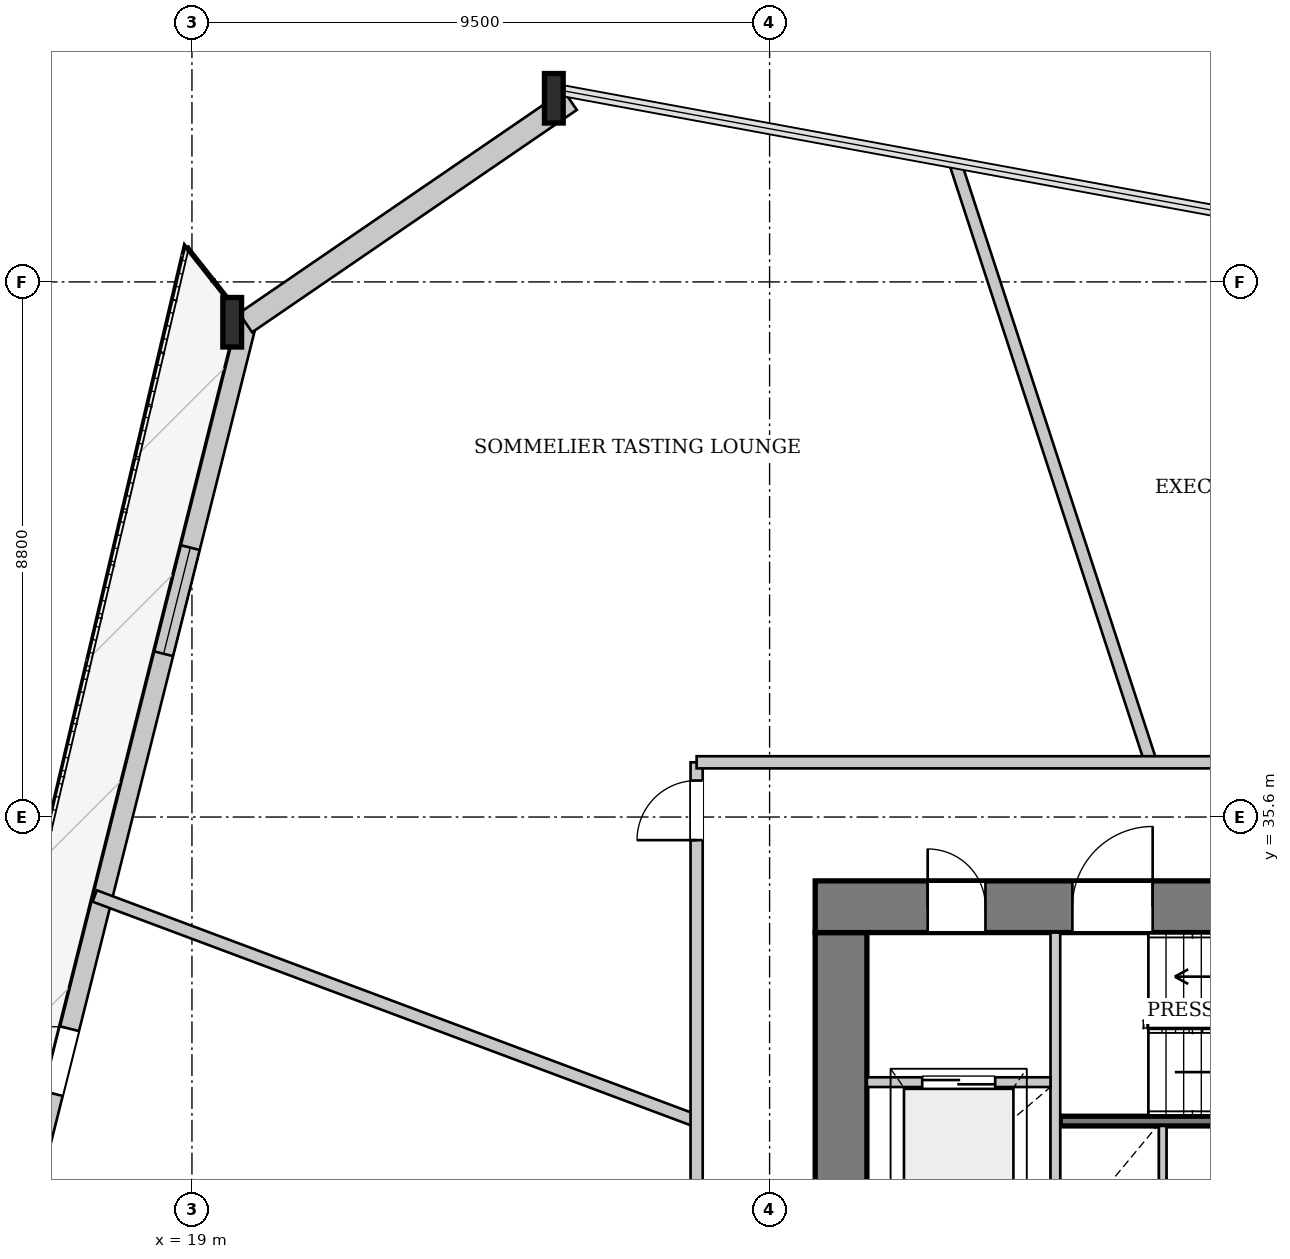
"""IFC4 building model, lengths in metres.
Left out: names, types, materials, properties, quantities, classifications, styles, units other than length and angle.
Written with IfcOpenShell. Run it as: python <this file> out.ifc"""

import sys

from ifc_helpers import new_model, si_unit, direction, frame, frame_2d, origin, origin_2d, place, context, subcontext, project, spatial, rectangle, i_section, extrude, source, transform, mapped, element, fill, save


model = new_model("IFC4")
c1 = context("Model", 3, precision=1e-05, world=origin(), true_north=direction((0.0, 1.0)))
c2 = subcontext(c1, "Body", "Model", "MODEL_VIEW")
j1 = project(units=[si_unit("LENGTHUNIT", "METRE"), si_unit("PLANEANGLEUNIT", "RADIAN")], contexts=[c1])
p1 = place(None, origin())
s1 = spatial("IfcSite", under=j1, at=p1, CompositionType="ELEMENT")
p2 = place(p1, origin())
s2 = spatial("IfcBuilding", under=s1, at=p2, CompositionType="ELEMENT")
p3 = place(p2, frame((0.0, 0.0, 43.5)))
s3 = spatial("IfcBuildingStorey", under=s2, at=p3, CompositionType="ELEMENT", Elevation=43.5)
m1 = source(origin(), c2, "Body", "SweptSolid", [
    extrude(i_section(OverallWidth=0.308, OverallDepth=0.814, WebThickness=0.021, FlangeThickness=0.04, at=origin_2d()), origin(), (0.0, 0.0, 1.0), 3.409),
])
p4 = place(p3, frame((25.115, 47.542, 0.0), z_axis=(-0.095810648173, -0.071392538287, 0.992836051508), x_axis=(0.597503990576, -0.801865937202, 0.0)))
e1 = element("IfcColumn", 1, at=p4, inside=s3, PredefinedType="COLUMN", context=c2, shape_type="MappedRepresentation", body=[
    mapped(m1, transform((0.0, 0.0, 0.0), x_axis=(1.0, 0.0, 0.0), y_axis=(0.0, 1.0, 0.0), z_axis=(0.0, 0.0, 1.0), scale=1.0)),
])
m2 = source(origin(), c2, "Body", "SweptSolid", [
    extrude(i_section(OverallWidth=0.308, OverallDepth=0.814, WebThickness=0.021, FlangeThickness=0.04, at=origin_2d()), origin(), (0.0, 0.0, 1.0), 3.405),
])
p5 = place(p3, frame((19.775, 43.885, 0.0), z_axis=(-0.06610046302, -0.086962973583, 0.994016181968), x_axis=(0.796124250752, -0.605133189772, 0.0)))
e2 = element("IfcColumn", 2, at=p5, inside=s3, PredefinedType="COLUMN", context=c2, shape_type="MappedRepresentation", body=[
    mapped(m2, transform((0.0, 0.0, 0.0), x_axis=(1.0, 0.0, 0.0), y_axis=(0.0, 1.0, 0.0), z_axis=(0.0, 0.0, 1.0), scale=1.0)),
])
p6 = place(p3, frame((15.405, 25.816, 0.0), z_axis=(0.0, 0.0, 1.0), x_axis=(0.243422395621, 0.969920376789, 0.0)))
e3 = element("IfcWall", 3, at=p6, inside=s3, PredefinedType="SOLIDWALL", context=c2, shape_type="SweptSolid", body=[
    extrude(rectangle(XDim=18.59, YDim=0.32, at=frame_2d((9.295, 0.0))), origin(), (0.0, 0.0, 1.0), 2.592),
])
p7 = place(p6, frame((5.399, 0.0, 0.0)))
e4 = element("IfcOpeningElement", 4, at=p7, cuts=e3, PredefinedType="OPENING", context=c2, shape_type="SweptSolid", body=[
    extrude(rectangle(XDim=1.1, YDim=2.3, at=frame_2d((0.55, 1.15))), frame((0.0, 0.17, 0.0), z_axis=(0.0, -1.0, 0.0), x_axis=(1.0, 0.0, 0.0)), (0.0, 0.0, 1.0), 0.34),
])
p8 = place(p6, frame((12.856, 0.0, 0.272)))
e5 = element("IfcOpeningElement", 5, at=p8, cuts=e3, PredefinedType="OPENING", context=c2, shape_type="SweptSolid", body=[
    extrude(rectangle(XDim=1.8, YDim=2.2, at=frame_2d((0.9, 1.1))), frame((0.0, 0.17, 0.0), z_axis=(0.0, -1.0, 0.0), x_axis=(1.0, 0.0, 0.0)), (0.0, 0.0, 1.0), 0.34),
])
p9 = place(p3, frame((19.882, 43.728, 0.0), z_axis=(0.0, 0.0, 1.0), x_axis=(0.825091616756, 0.564998959255, 0.0)))
e6 = element("IfcWall", 6, at=p9, inside=s3, PredefinedType="SOLIDWALL", context=c2, shape_type="SweptSolid", body=[
    extrude(rectangle(XDim=6.472, YDim=0.38, at=frame_2d((3.236, 0.0))), origin(), (0.0, 0.0, 1.0), 2.592),
])
p10 = place(p3, frame((29.675, 19.5, 0.0), z_axis=(0.0, 0.0, 1.0), x_axis=(0.0, 1.0, 0.0)))
e7 = element("IfcWall", 7, at=p10, inside=s3, PredefinedType="SHEAR", context=c2, shape_type="SweptSolid", body=[
    extrude(rectangle(XDim=14.2, YDim=0.85, at=frame_2d((7.1, 0.0))), origin(), (0.0, 0.0, 1.0), 3.3),
])
p11 = place(p10, frame((7.42, 0.0, 0.0)))
e8 = element("IfcOpeningElement", 8, at=p11, cuts=e7, PredefinedType="OPENING", context=c2, shape_type="SweptSolid", body=[
    extrude(rectangle(XDim=1.6, YDim=2.2, at=frame_2d((0.8, 1.1))), frame((0.0, 0.435, 0.0), z_axis=(0.0, -1.0, 0.0), x_axis=(1.0, 0.0, 0.0)), (0.0, 0.0, 1.0), 0.87),
])
p12 = place(p3, frame((29.25, 34.125, 0.0), z_axis=(0.0, 0.0, 1.0), x_axis=(1.0, 0.0, 0.0)))
e9 = element("IfcWall", 9, at=p12, inside=s3, PredefinedType="SHEAR", context=c2, shape_type="SweptSolid", body=[
    extrude(rectangle(XDim=17.5, YDim=0.85, at=frame_2d((8.75, 0.0))), origin(), (0.0, 0.0, 1.0), 3.3),
])
p13 = place(p12, frame((1.85, 0.0, 0.0)))
e10 = element("IfcOpeningElement", 10, at=p13, cuts=e9, PredefinedType="OPENING", context=c2, shape_type="SweptSolid", body=[
    extrude(rectangle(XDim=0.95, YDim=2.1, at=frame_2d((0.475, 1.05))), frame((0.0, 0.435, 0.0), z_axis=(0.0, -1.0, 0.0), x_axis=(1.0, 0.0, 0.0)), (0.0, 0.0, 1.0), 0.87),
])
p14 = place(p12, frame((4.23, 0.0, 0.0)))
e11 = element("IfcOpeningElement", 11, at=p14, cuts=e9, PredefinedType="OPENING", context=c2, shape_type="SweptSolid", body=[
    extrude(rectangle(XDim=1.32, YDim=2.2, at=frame_2d((0.66, 1.1))), frame((0.0, 0.435, 0.0), z_axis=(0.0, -1.0, 0.0), x_axis=(1.0, 0.0, 0.0)), (0.0, 0.0, 1.0), 0.87),
])
p15 = place(p12, frame((15.3, 0.0, 0.0)))
e12 = element("IfcOpeningElement", 12, at=p15, cuts=e9, PredefinedType="OPENING", context=c2, shape_type="SweptSolid", body=[
    extrude(rectangle(XDim=0.95, YDim=2.1, at=frame_2d((0.475, 1.05))), frame((0.0, 0.435, 0.0), z_axis=(0.0, -1.0, 0.0), x_axis=(1.0, 0.0, 0.0)), (0.0, 0.0, 1.0), 0.87),
])
p16 = place(p3, frame((33.28, 30.6, 0.0), z_axis=(0.0, 0.0, 1.0), x_axis=(1.0, 0.0, 0.0)))
e13 = element("IfcWall", 13, at=p16, inside=s3, PredefinedType="PARTITIONING", context=c2, shape_type="SweptSolid", body=[
    extrude(rectangle(XDim=7.3, YDim=0.16, at=frame_2d((3.65, 0.0))), origin(), (0.0, 0.0, 1.0), 3.3),
])
p17 = place(p3, frame((33.2, 28.44, 0.0), z_axis=(0.0, 0.0, 1.0), x_axis=(0.0, 1.0, 0.0)))
e14 = element("IfcWall", 14, at=p17, inside=s3, PredefinedType="PARTITIONING", context=c2, shape_type="SweptSolid", body=[
    extrude(rectangle(XDim=5.26, YDim=0.16, at=frame_2d((2.63, 0.0))), origin(), (0.0, 0.0, 1.0), 3.3),
])
p18 = place(p3, frame((30.1, 31.24, 0.0), z_axis=(0.0, 0.0, 1.0), x_axis=(1.0, 0.0, 0.0)))
e15 = element("IfcWall", 15, at=p18, inside=s3, PredefinedType="PARTITIONING", context=c2, shape_type="SweptSolid", body=[
    extrude(rectangle(XDim=3.02, YDim=0.16, at=frame_2d((1.51, 0.0))), origin(), (0.0, 0.0, 1.0), 3.3),
])
p19 = place(p18, frame((0.91, 0.0, 0.0)))
e16 = element("IfcOpeningElement", 16, at=p19, cuts=e15, PredefinedType="OPENING", context=c2, shape_type="SweptSolid", body=[
    extrude(rectangle(XDim=1.2, YDim=2.2, at=frame_2d((0.6, 1.1))), frame((0.0, 0.09, 0.0), z_axis=(0.0, -1.0, 0.0), x_axis=(1.0, 0.0, 0.0)), (0.0, 0.0, 1.0), 0.18),
])
p20 = place(p3, frame((34.965, 28.6, 0.0), z_axis=(0.0, 0.0, 1.0), x_axis=(0.0, 1.0, 0.0)))
e17 = element("IfcWall", 17, at=p20, inside=s3, PredefinedType="PARTITIONING", context=c2, shape_type="SweptSolid", body=[
    extrude(rectangle(XDim=1.92, YDim=0.125, at=frame_2d((0.96, 0.0))), origin(), (0.0, 0.0, 1.0), 3.3),
])
p21 = place(p3, frame((34.77, 36.5, 0.0), z_axis=(0.0, 0.0, 1.0), x_axis=(-0.310204417854, 0.950669879161, 0.0)))
e18 = element("IfcWall", 18, at=p21, inside=s3, PredefinedType="PARTITIONING", context=c2, shape_type="SweptSolid", body=[
    extrude(rectangle(XDim=10.334, YDim=0.2, at=frame_2d((5.167, 0.0))), origin(), (0.0, 0.0, 1.0), 3.3),
])
p22 = place(p3, frame((27.3, 30.601, 0.0), z_axis=(0.0, 0.0, 1.0), x_axis=(-0.936674280528, 0.350201787827, 0.0)))
e19 = element("IfcWall", 19, at=p22, inside=s3, PredefinedType="PARTITIONING", context=c2, shape_type="SweptSolid", body=[
    extrude(rectangle(XDim=10.569, YDim=0.2, at=frame_2d((5.284, 0.0))), origin(), (0.0, 0.0, 1.0), 3.3),
])
p23 = place(p3, frame((27.3, 16.7, 0.0), z_axis=(0.0, 0.0, 1.0), x_axis=(0.0, 1.0, 0.0)))
e20 = element("IfcWall", 20, at=p23, inside=s3, PredefinedType="PARTITIONING", context=c2, shape_type="SweptSolid", body=[
    extrude(rectangle(XDim=19.8, YDim=0.2, at=frame_2d((9.9, 0.0))), origin(), (0.0, 0.0, 1.0), 3.3),
])
p24 = place(p23, frame((18.52, 0.0, 0.0)))
e21 = element("IfcOpeningElement", 21, at=p24, cuts=e20, PredefinedType="OPENING", context=c2, shape_type="SweptSolid", body=[
    extrude(rectangle(XDim=0.98, YDim=2.15, at=frame_2d((0.49, 1.075))), frame((0.0, 0.11, 0.0), z_axis=(0.0, -1.0, 0.0), x_axis=(1.0, 0.0, 0.0)), (0.0, 0.0, 1.0), 0.22),
])
p25 = place(p23, frame((5.803, 0.0, 0.0)))
e22 = element("IfcOpeningElement", 22, at=p25, cuts=e20, PredefinedType="OPENING", context=c2, shape_type="SweptSolid", body=[
    extrude(rectangle(XDim=0.98, YDim=2.15, at=frame_2d((0.49, 1.075))), frame((0.0, 0.11, 0.0), z_axis=(0.0, -1.0, 0.0), x_axis=(1.0, 0.0, 0.0)), (0.0, 0.0, 1.0), 0.22),
])
p26 = place(p3, frame((27.3, 36.5, 0.0), z_axis=(0.0, 0.0, 1.0), x_axis=(1.0, 0.0, 0.0)))
e23 = element("IfcWall", 23, at=p26, inside=s3, PredefinedType="PARTITIONING", context=c2, shape_type="SweptSolid", body=[
    extrude(rectangle(XDim=21.4, YDim=0.2, at=frame_2d((10.7, 0.0))), origin(), (0.0, 0.0, 1.0), 3.3),
])
p27 = place(p26, frame((20.12, 0.0, 0.0)))
e24 = element("IfcOpeningElement", 24, at=p27, cuts=e23, PredefinedType="OPENING", context=c2, shape_type="SweptSolid", body=[
    extrude(rectangle(XDim=0.98, YDim=2.15, at=frame_2d((0.49, 1.075))), frame((0.0, 0.11, 0.0), z_axis=(0.0, -1.0, 0.0), x_axis=(1.0, 0.0, 0.0)), (0.0, 0.0, 1.0), 0.22),
])
p28 = place(p26, frame((12.385, 0.0, 0.0)))
e25 = element("IfcOpeningElement", 25, at=p28, cuts=e23, PredefinedType="OPENING", context=c2, shape_type="SweptSolid", body=[
    extrude(rectangle(XDim=0.98, YDim=2.15, at=frame_2d((0.49, 1.075))), frame((0.0, 0.11, 0.0), z_axis=(0.0, -1.0, 0.0), x_axis=(1.0, 0.0, 0.0)), (0.0, 0.0, 1.0), 0.22),
])
m3 = source(origin(), c2, "Body", "SweptSolid", [
    extrude(rectangle(XDim=1.1, YDim=2.3, at=frame_2d((0.55, 1.15))), frame((0.0, 0.025, 0.0), z_axis=(0.0, -1.0, 0.0), x_axis=(1.0, 0.0, 0.0)), (0.0, 0.0, 1.0), 0.05),
])
p29 = place(p7, origin())
e26 = element("IfcDoor", 26, at=p29, inside=s3, OperationType="SINGLE_SWING_LEFT", PredefinedType="DOOR", context=c2, shape_type="MappedRepresentation", body=[
    mapped(m3, transform((0.0, 0.0, 0.0), x_axis=(1.0, 0.0, 0.0), y_axis=(0.0, 1.0, 0.0), z_axis=(0.0, 0.0, 1.0), scale=1.0)),
])
fill(e4, e26)
m4 = source(origin(), c2, "Body", "SweptSolid", [
    extrude(rectangle(XDim=1.8, YDim=2.2, at=frame_2d((0.9, 1.1))), frame((0.0, 0.03, 0.0), z_axis=(0.0, -1.0, 0.0), x_axis=(1.0, 0.0, 0.0)), (0.0, 0.0, 1.0), 0.06),
])
p30 = place(p8, origin())
e27 = element("IfcWindow", 27, at=p30, inside=s3, PartitioningType="SINGLE_PANEL", PredefinedType="WINDOW", context=c2, shape_type="MappedRepresentation", body=[
    mapped(m4, transform((0.0, 0.0, 0.0), x_axis=(1.0, 0.0, 0.0), y_axis=(0.0, 1.0, 0.0), z_axis=(0.0, 0.0, 1.0), scale=1.0)),
])
fill(e5, e27)
m5 = source(origin(), c2, "Body", "SweptSolid", [
    extrude(rectangle(XDim=0.95, YDim=2.1, at=frame_2d((0.475, 1.05))), frame((0.0, 0.025, 0.0), z_axis=(0.0, -1.0, 0.0), x_axis=(1.0, 0.0, 0.0)), (0.0, 0.0, 1.0), 0.05),
])
p31 = place(p13, origin())
e28 = element("IfcDoor", 28, at=p31, inside=s3, OperationType="SINGLE_SWING_LEFT", PredefinedType="DOOR", context=c2, shape_type="MappedRepresentation", body=[
    mapped(m5, transform((0.0, 0.0, 0.0), x_axis=(1.0, 0.0, 0.0), y_axis=(0.0, 1.0, 0.0), z_axis=(0.0, 0.0, 1.0), scale=1.0)),
])
fill(e10, e28)
m6 = source(origin(), c2, "Body", "SweptSolid", [
    extrude(rectangle(XDim=1.32, YDim=2.2, at=frame_2d((0.66, 1.1))), frame((0.0, 0.025, 0.0), z_axis=(0.0, -1.0, 0.0), x_axis=(1.0, 0.0, 0.0)), (0.0, 0.0, 1.0), 0.05),
])
p32 = place(p14, origin())
e29 = element("IfcDoor", 29, at=p32, inside=s3, OperationType="SINGLE_SWING_RIGHT", PredefinedType="DOOR", context=c2, shape_type="MappedRepresentation", body=[
    mapped(m6, transform((0.0, 0.0, 0.0), x_axis=(1.0, 0.0, 0.0), y_axis=(0.0, 1.0, 0.0), z_axis=(0.0, 0.0, 1.0), scale=1.0)),
])
fill(e11, e29)
m7 = source(origin(), c2, "Body", "SweptSolid", [
    extrude(rectangle(XDim=1.2, YDim=2.2, at=frame_2d((0.6, 1.1))), frame((0.0, 0.025, 0.0), z_axis=(0.0, -1.0, 0.0), x_axis=(1.0, 0.0, 0.0)), (0.0, 0.0, 1.0), 0.05),
])
p33 = place(p19, origin())
e30 = element("IfcDoor", 30, at=p33, inside=s3, OperationType="DOUBLE_DOOR_SLIDING", PredefinedType="DOOR", context=c2, shape_type="MappedRepresentation", body=[
    mapped(m7, transform((0.0, 0.0, 0.0), x_axis=(1.0, 0.0, 0.0), y_axis=(0.0, 1.0, 0.0), z_axis=(0.0, 0.0, 1.0), scale=1.0)),
])
fill(e16, e30)
m8 = source(origin(), c2, "Body", "SweptSolid", [
    extrude(rectangle(XDim=0.98, YDim=2.15, at=frame_2d((0.49, 1.075))), frame((0.0, 0.025, 0.0), z_axis=(0.0, -1.0, 0.0), x_axis=(1.0, 0.0, 0.0)), (0.0, 0.0, 1.0), 0.05),
])
p34 = place(p24, origin())
e31 = element("IfcDoor", 31, at=p34, inside=s3, OperationType="SINGLE_SWING_LEFT", PredefinedType="DOOR", context=c2, shape_type="MappedRepresentation", body=[
    mapped(m8, transform((0.0, 0.0, 0.0), x_axis=(1.0, 0.0, 0.0), y_axis=(0.0, 1.0, 0.0), z_axis=(0.0, 0.0, 1.0), scale=1.0)),
])
fill(e21, e31)
save(model, sys.argv[1])
